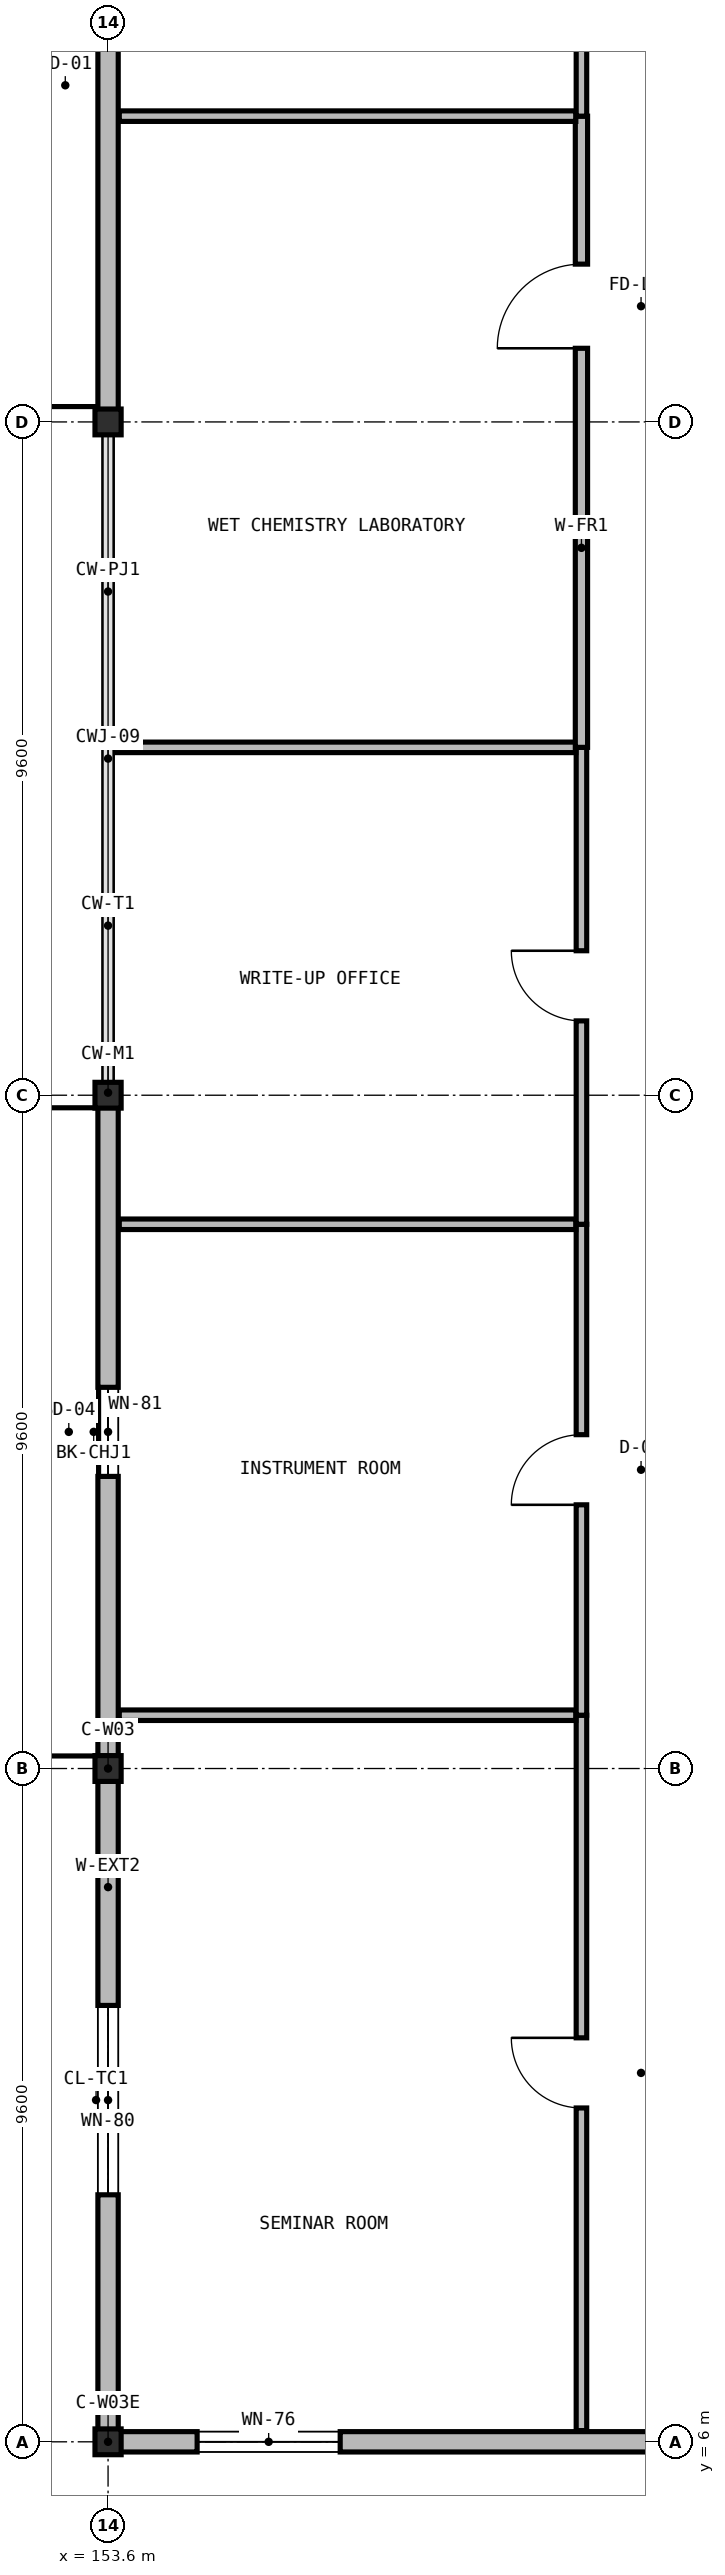
"""IFC4 building model, lengths in metres.
Left out: names, types, materials, properties, quantities, classifications, styles, units other than length and angle.
Written with IfcOpenShell. Run it as: python <this file> out.ifc"""

import sys

from ifc_helpers import new_model, si_unit, direction, frame, frame_2d, origin, origin_2d, place, context, subcontext, project, spatial, rectangle, i_section, extrude, element, fill, save


model = new_model("IFC4")
c1 = context("Model", 3, precision=1e-05, world=origin(), true_north=direction((0.0, 1.0)))
c2 = subcontext(c1, "Body", "Model", "MODEL_VIEW")
j1 = project(units=[si_unit("LENGTHUNIT", "METRE"), si_unit("PLANEANGLEUNIT", "RADIAN")], contexts=[c1])
p1 = place(None, origin())
s1 = spatial("IfcSite", under=j1, at=p1, CompositionType="ELEMENT")
p2 = place(p1, origin())
s2 = spatial("IfcBuilding", under=s1, at=p2, CompositionType="ELEMENT")
p3 = place(p2, frame((0.0, 0.0, 18.9)))
s3 = spatial("IfcBuildingStorey", under=s2, at=p3, CompositionType="ELEMENT", Elevation=18.9)
for number, where, z_axis, x_axis in (
    (1, (153.6, 6.0, 0.0), (0.0, 0.0, 1.0), (1.0, 0.0, 0.0)),
    (2, (153.6, 15.6, 0.0), (0.0, 0.0, 1.0), (1.0, 0.0, 0.0)),
    (3, (153.6, 25.2, 0.0), (0.0, 0.0, 1.0), (1.0, 0.0, 0.0)),
    (4, (153.6, 34.8, 0.0), (0.0, 0.0, 1.0), (1.0, 0.0, 0.0)),
):
    element("IfcColumn", number, at=place(p3, frame(where, z_axis=z_axis, x_axis=x_axis)), inside=s3, PredefinedType="COLUMN", context=c2, shape_type="SweptSolid", body=[
        extrude(i_section(OverallWidth=0.373, OverallDepth=0.368, WebThickness=0.017, FlangeThickness=0.027, at=origin_2d()), origin(), (0.0, 0.0, 1.0), 4.55),
    ])
p4 = place(p3, frame((153.6, 6.149, 0.0), z_axis=(0.0, 0.0, 1.0), x_axis=(0.0, 1.0, 0.0)))
e5 = element("IfcWall", 5, at=p4, inside=s3, PredefinedType="SOLIDWALL", context=c2, shape_type="SweptSolid", body=[
    extrude(rectangle(XDim=9.447, YDim=0.29, at=frame_2d((4.724, 0.0))), origin(), (0.0, 0.0, 1.0), 3.893),
])
p5 = place(p4, frame((3.373, 0.0, 0.95)))
e6 = element("IfcOpeningElement", 6, at=p5, cuts=e5, PredefinedType="OPENING", context=c2, shape_type="SweptSolid", body=[
    extrude(rectangle(XDim=2.7, YDim=1.56, at=frame_2d((1.35, 0.78))), frame((0.0, 0.155, 0.0), z_axis=(0.0, -1.0, 0.0), x_axis=(1.0, 0.0, 0.0)), (0.0, 0.0, 1.0), 0.31),
])
p6 = place(p3, frame((153.6, 15.604, 0.0), z_axis=(0.0, 0.0, 1.0), x_axis=(0.0, 1.0, 0.0)))
e7 = element("IfcWall", 7, at=p6, inside=s3, PredefinedType="SOLIDWALL", context=c2, shape_type="SweptSolid", body=[
    extrude(rectangle(XDim=9.592, YDim=0.29, at=frame_2d((4.796, 0.0))), origin(), (0.0, 0.0, 1.0), 3.893),
])
p7 = place(p6, frame((4.161, 0.0, 0.95)))
e8 = element("IfcOpeningElement", 8, at=p7, cuts=e7, PredefinedType="OPENING", context=c2, shape_type="SweptSolid", body=[
    extrude(rectangle(XDim=1.27, YDim=1.48, at=frame_2d((0.635, 0.74))), frame((0.0, 0.155, 0.0), z_axis=(0.0, -1.0, 0.0), x_axis=(1.0, 0.0, 0.0)), (0.0, 0.0, 1.0), 0.31),
])
p8 = place(p3, frame((153.6, 34.804, 0.0), z_axis=(0.0, 0.0, 1.0), x_axis=(0.0, 1.0, 0.0)))
e9 = element("IfcWall", 9, at=p8, inside=s3, PredefinedType="SOLIDWALL", context=c2, shape_type="SweptSolid", body=[
    extrude(rectangle(XDim=9.592, YDim=0.29, at=frame_2d((4.796, 0.0))), origin(), (0.0, 0.0, 1.0), 3.893),
])
p9 = place(p3, frame((163.196, 6.0, 0.0), z_axis=(0.0, 0.0, 1.0), x_axis=(-1.0, 0.0, 0.0)))
e10 = element("IfcWall", 10, at=p9, inside=s3, PredefinedType="SOLIDWALL", context=c2, shape_type="SweptSolid", body=[
    extrude(rectangle(XDim=9.741, YDim=0.29, at=frame_2d((4.871, 0.0))), origin(), (0.0, 0.0, 1.0), 3.884),
])
p10 = place(p9, frame((6.286, 0.0, 0.95)))
e11 = element("IfcOpeningElement", 11, at=p10, cuts=e10, PredefinedType="OPENING", context=c2, shape_type="SweptSolid", body=[
    extrude(rectangle(XDim=2.04, YDim=1.4, at=frame_2d((1.02, 0.7))), frame((0.0, 0.155, 0.0), z_axis=(0.0, -1.0, 0.0), x_axis=(1.0, 0.0, 0.0)), (0.0, 0.0, 1.0), 0.31),
])
p11 = place(p3, frame((160.35, 6.16, 0.0), z_axis=(0.0, 0.0, 1.0), x_axis=(0.0, 1.0, 0.0)))
e12 = element("IfcWall", 12, at=p11, inside=s3, PredefinedType="PARTITIONING", context=c2, shape_type="SweptSolid", body=[
    extrude(rectangle(XDim=10.2, YDim=0.15, at=frame_2d((5.1, 0.0))), origin(), (0.0, 0.0, 1.0), 4.3),
])
p12 = place(p11, frame((4.6, 0.0, 0.0)))
e13 = element("IfcOpeningElement", 13, at=p12, cuts=e12, PredefinedType="OPENING", context=c2, shape_type="SweptSolid", body=[
    extrude(rectangle(XDim=1.0, YDim=2.2, at=frame_2d((0.5, 1.1))), frame((0.0, 0.085, 0.0), z_axis=(0.0, -1.0, 0.0), x_axis=(1.0, 0.0, 0.0)), (0.0, 0.0, 1.0), 0.17),
])
p13 = place(p3, frame((153.76, 16.36, 0.0), z_axis=(0.0, 0.0, 1.0), x_axis=(1.0, 0.0, 0.0)))
e14 = element("IfcWall", 14, at=p13, inside=s3, PredefinedType="PARTITIONING", context=c2, shape_type="SweptSolid", body=[
    extrude(rectangle(XDim=6.51, YDim=0.15, at=frame_2d((3.255, 0.0))), origin(), (0.0, 0.0, 1.0), 4.3),
])
p14 = place(p3, frame((160.35, 16.36, 0.0), z_axis=(0.0, 0.0, 1.0), x_axis=(0.0, 1.0, 0.0)))
e15 = element("IfcWall", 15, at=p14, inside=s3, PredefinedType="PARTITIONING", context=c2, shape_type="SweptSolid", body=[
    extrude(rectangle(XDim=7.0, YDim=0.15, at=frame_2d((3.5, 0.0))), origin(), (0.0, 0.0, 1.0), 4.3),
])
p15 = place(p14, frame((3.0, 0.0, 0.0)))
e16 = element("IfcOpeningElement", 16, at=p15, cuts=e15, PredefinedType="OPENING", context=c2, shape_type="SweptSolid", body=[
    extrude(rectangle(XDim=1.0, YDim=2.2, at=frame_2d((0.5, 1.1))), frame((0.0, 0.085, 0.0), z_axis=(0.0, -1.0, 0.0), x_axis=(1.0, 0.0, 0.0)), (0.0, 0.0, 1.0), 0.17),
])
p16 = place(p3, frame((153.76, 23.36, 0.0), z_axis=(0.0, 0.0, 1.0), x_axis=(1.0, 0.0, 0.0)))
e17 = element("IfcWall", 17, at=p16, inside=s3, PredefinedType="PARTITIONING", context=c2, shape_type="SweptSolid", body=[
    extrude(rectangle(XDim=6.51, YDim=0.15, at=frame_2d((3.255, 0.0))), origin(), (0.0, 0.0, 1.0), 4.3),
])
p17 = place(p3, frame((160.35, 23.36, 0.0), z_axis=(0.0, 0.0, 1.0), x_axis=(0.0, 1.0, 0.0)))
e18 = element("IfcWall", 18, at=p17, inside=s3, PredefinedType="PARTITIONING", context=c2, shape_type="SweptSolid", body=[
    extrude(rectangle(XDim=6.8, YDim=0.15, at=frame_2d((3.4, 0.0))), origin(), (0.0, 0.0, 1.0), 4.3),
])
p18 = place(p17, frame((2.9, 0.0, 0.0)))
e19 = element("IfcOpeningElement", 19, at=p18, cuts=e18, PredefinedType="OPENING", context=c2, shape_type="SweptSolid", body=[
    extrude(rectangle(XDim=1.0, YDim=2.2, at=frame_2d((0.5, 1.1))), frame((0.0, 0.085, 0.0), z_axis=(0.0, -1.0, 0.0), x_axis=(1.0, 0.0, 0.0)), (0.0, 0.0, 1.0), 0.17),
])
p19 = place(p3, frame((153.66, 30.16, 0.0), z_axis=(0.0, 0.0, 1.0), x_axis=(1.0, 0.0, 0.0)))
e20 = element("IfcWall", 20, at=p19, inside=s3, PredefinedType="PARTITIONING", context=c2, shape_type="SweptSolid", body=[
    extrude(rectangle(XDim=6.61, YDim=0.15, at=frame_2d((3.305, 0.0))), origin(), (0.0, 0.0, 1.0), 4.3),
])
p20 = place(p3, frame((160.35, 30.16, 0.0), z_axis=(0.0, 0.0, 1.0), x_axis=(0.0, 1.0, 0.0)))
e21 = element("IfcWall", 21, at=p20, inside=s3, PredefinedType="PARTITIONING", context=c2, shape_type="SweptSolid", body=[
    extrude(rectangle(XDim=9.0, YDim=0.175, at=frame_2d((4.5, 0.0))), origin(), (0.0, 0.0, 1.0), 4.3),
])
p21 = place(p20, frame((5.69, 0.0, 0.0)))
e22 = element("IfcOpeningElement", 22, at=p21, cuts=e21, PredefinedType="OPENING", context=c2, shape_type="SweptSolid", body=[
    extrude(rectangle(XDim=1.2, YDim=2.2, at=frame_2d((0.6, 1.1))), frame((0.0, 0.097, 0.0), z_axis=(0.0, -1.0, 0.0), x_axis=(1.0, 0.0, 0.0)), (0.0, 0.0, 1.0), 0.195),
])
p22 = place(p3, frame((153.76, 39.16, 0.0), z_axis=(0.0, 0.0, 1.0), x_axis=(1.0, 0.0, 0.0)))
e23 = element("IfcWall", 23, at=p22, inside=s3, PredefinedType="PARTITIONING", context=c2, shape_type="SweptSolid", body=[
    extrude(rectangle(XDim=6.51, YDim=0.15, at=frame_2d((3.255, 0.0))), origin(), (0.0, 0.0, 1.0), 4.3),
])
p23 = place(p3, frame((160.35, 39.16, 0.0), z_axis=(0.0, 0.0, 1.0), x_axis=(0.0, 1.0, 0.0)))
e24 = element("IfcWall", 24, at=p23, inside=s3, PredefinedType="PARTITIONING", context=c2, shape_type="SweptSolid", body=[
    extrude(rectangle(XDim=10.2, YDim=0.15, at=frame_2d((5.1, 0.0))), origin(), (0.0, 0.0, 1.0), 4.3),
])
p24 = place(p23, frame((6.39, 0.0, 0.0)))
e25 = element("IfcOpeningElement", 25, at=p24, cuts=e24, PredefinedType="OPENING", context=c2, shape_type="SweptSolid", body=[
    extrude(rectangle(XDim=1.0, YDim=2.2, at=frame_2d((0.5, 1.1))), frame((0.0, 0.085, 0.0), z_axis=(0.0, -1.0, 0.0), x_axis=(1.0, 0.0, 0.0)), (0.0, 0.0, 1.0), 0.17),
])
p25 = place(p5, origin())
e26 = element("IfcWindow", 26, at=p25, inside=s3, PartitioningType="SINGLE_PANEL", PredefinedType="WINDOW", context=c2, shape_type="SweptSolid", body=[
    extrude(rectangle(XDim=2.7, YDim=1.56, at=frame_2d((1.35, 0.78))), frame((0.0, 0.03, 0.0), z_axis=(0.0, -1.0, 0.0), x_axis=(1.0, 0.0, 0.0)), (0.0, 0.0, 1.0), 0.06),
])
fill(e6, e26)
p26 = place(p7, origin())
e27 = element("IfcWindow", 27, at=p26, inside=s3, PartitioningType="SINGLE_PANEL", PredefinedType="WINDOW", context=c2, shape_type="SweptSolid", body=[
    extrude(rectangle(XDim=1.27, YDim=1.48, at=frame_2d((0.635, 0.74))), frame((0.0, 0.03, 0.0), z_axis=(0.0, -1.0, 0.0), x_axis=(1.0, 0.0, 0.0)), (0.0, 0.0, 1.0), 0.06),
])
fill(e8, e27)
p27 = place(p10, origin())
e28 = element("IfcWindow", 28, at=p27, inside=s3, PartitioningType="SINGLE_PANEL", PredefinedType="WINDOW", context=c2, shape_type="SweptSolid", body=[
    extrude(rectangle(XDim=2.04, YDim=1.4, at=frame_2d((1.02, 0.7))), frame((0.0, 0.03, 0.0), z_axis=(0.0, -1.0, 0.0), x_axis=(1.0, 0.0, 0.0)), (0.0, 0.0, 1.0), 0.06),
])
fill(e11, e28)
p28 = place(p12, origin())
e29 = element("IfcDoor", 29, at=p28, inside=s3, OperationType="SINGLE_SWING_RIGHT", PredefinedType="DOOR", context=c2, shape_type="SweptSolid", body=[
    extrude(rectangle(XDim=1.0, YDim=2.2, at=frame_2d((0.5, 1.1))), frame((0.0, 0.025, 0.0), z_axis=(0.0, -1.0, 0.0), x_axis=(1.0, 0.0, 0.0)), (0.0, 0.0, 1.0), 0.05),
])
fill(e13, e29)
p29 = place(p15, origin())
e30 = element("IfcDoor", 30, at=p29, inside=s3, OperationType="SINGLE_SWING_LEFT", PredefinedType="DOOR", context=c2, shape_type="SweptSolid", body=[
    extrude(rectangle(XDim=1.0, YDim=2.2, at=frame_2d((0.5, 1.1))), frame((0.0, 0.025, 0.0), z_axis=(0.0, -1.0, 0.0), x_axis=(1.0, 0.0, 0.0)), (0.0, 0.0, 1.0), 0.05),
])
fill(e16, e30)
p30 = place(p18, origin())
e31 = element("IfcDoor", 31, at=p30, inside=s3, OperationType="SINGLE_SWING_RIGHT", PredefinedType="DOOR", context=c2, shape_type="SweptSolid", body=[
    extrude(rectangle(XDim=1.0, YDim=2.2, at=frame_2d((0.5, 1.1))), frame((0.0, 0.025, 0.0), z_axis=(0.0, -1.0, 0.0), x_axis=(1.0, 0.0, 0.0)), (0.0, 0.0, 1.0), 0.05),
])
fill(e19, e31)
p31 = place(p21, origin())
e32 = element("IfcDoor", 32, at=p31, inside=s3, OperationType="SINGLE_SWING_LEFT", PredefinedType="DOOR", context=c2, shape_type="SweptSolid", body=[
    extrude(rectangle(XDim=1.2, YDim=2.2, at=frame_2d((0.6, 1.1))), frame((0.0, 0.025, 0.0), z_axis=(0.0, -1.0, 0.0), x_axis=(1.0, 0.0, 0.0)), (0.0, 0.0, 1.0), 0.05),
])
fill(e22, e32)
save(model, sys.argv[1])
